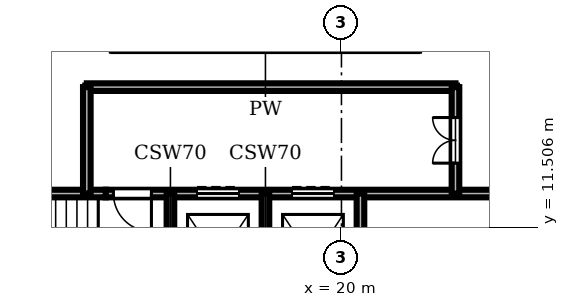
"""IFC4 building model, lengths in metres.
Left out: names, types, materials, properties, quantities, classifications, styles, units other than length and angle.
Written with IfcOpenShell. Run it as: python <this file> out.ifc"""

import sys

from ifc_helpers import new_model, si_unit, direction, frame, frame_2d, origin, place, context, subcontext, project, spatial, rectangle, extrude, element, fill, save


model = new_model("IFC4")
c1 = context("Model", 3, precision=1e-05, world=origin(), true_north=direction((0.0, 1.0)))
c2 = subcontext(c1, "Body", "Model", "MODEL_VIEW")
j1 = project(units=[si_unit("LENGTHUNIT", "METRE"), si_unit("PLANEANGLEUNIT", "RADIAN")], contexts=[c1])
p1 = place(None, origin())
s1 = spatial("IfcSite", under=j1, at=p1, CompositionType="ELEMENT")
p2 = place(p1, origin())
s2 = spatial("IfcBuilding", under=s1, at=p2, CompositionType="ELEMENT")
p3 = place(p2, frame((0.0, 0.0, 225.3)))
s3 = spatial("IfcBuildingStorey", under=s2, at=p3, CompositionType="ELEMENT", Elevation=225.3)
p4 = place(p3, frame((8.7, 12.4, 0.0), z_axis=(0.0, 0.0, 1.0), x_axis=(1.0, 0.0, 0.0)))
e1 = element("IfcWall", 1, at=p4, inside=s3, PredefinedType="SHEAR", context=c2, shape_type="SweptSolid", body=[
    extrude(rectangle(XDim=5.1, YDim=0.2, at=frame_2d((2.55, 0.0))), origin(), (0.0, 0.0, 1.0), 3.58),
])
p5 = place(p3, frame((13.8, 12.4, 0.0), z_axis=(0.0, 0.0, 1.0), x_axis=(1.0, 0.0, 0.0)))
e2 = element("IfcWall", 2, at=p5, inside=s3, PredefinedType="SHEAR", context=c2, shape_type="SweptSolid", body=[
    extrude(rectangle(XDim=13.5, YDim=0.2, at=frame_2d((6.75, 0.0))), origin(), (0.0, 0.0, 1.0), 3.58),
])
p6 = place(p5, frame((2.4, 0.0, 0.0)))
e3 = element("IfcOpeningElement", 3, at=p6, cuts=e2, PredefinedType="OPENING", context=c2, shape_type="SweptSolid", body=[
    extrude(rectangle(XDim=1.1, YDim=2.1, at=frame_2d((0.55, 1.05))), frame((0.0, 0.11, 0.0), z_axis=(0.0, -1.0, 0.0), x_axis=(1.0, 0.0, 0.0)), (0.0, 0.0, 1.0), 0.22),
])
p7 = place(p5, frame((4.9, 0.0, 0.0)))
e4 = element("IfcOpeningElement", 4, at=p7, cuts=e2, PredefinedType="OPENING", context=c2, shape_type="SweptSolid", body=[
    extrude(rectangle(XDim=1.1, YDim=2.1, at=frame_2d((0.55, 1.05))), frame((0.0, 0.11, 0.0), z_axis=(0.0, -1.0, 0.0), x_axis=(1.0, 0.0, 0.0)), (0.0, 0.0, 1.0), 0.22),
])
p8 = place(p5, frame((0.2, 0.0, 0.0)))
e5 = element("IfcOpeningElement", 5, at=p8, cuts=e2, PredefinedType="OPENING", context=c2, shape_type="SweptSolid", body=[
    extrude(rectangle(XDim=1.0, YDim=2.1, at=frame_2d((0.5, 1.05))), frame((0.0, 0.11, 0.0), z_axis=(0.0, -1.0, 0.0), x_axis=(1.0, 0.0, 0.0)), (0.0, 0.0, 1.0), 0.22),
])
p9 = place(p3, frame((13.3, 15.2, 0.0), z_axis=(0.0, 0.0, 1.0), x_axis=(1.0, 0.0, 0.0)))
e6 = element("IfcWall", 6, at=p9, inside=s3, PredefinedType="SHEAR", context=c2, shape_type="SweptSolid", body=[
    extrude(rectangle(XDim=9.7, YDim=0.2, at=frame_2d((4.85, 0.0))), origin(), (0.0, 0.0, 1.0), 3.58),
])
p10 = place(p3, frame((13.3, 12.4, 0.0), z_axis=(0.0, 0.0, 1.0), x_axis=(0.0, 1.0, 0.0)))
e7 = element("IfcWall", 7, at=p10, inside=s3, PredefinedType="SHEAR", context=c2, shape_type="SweptSolid", body=[
    extrude(rectangle(XDim=2.8, YDim=0.2, at=frame_2d((1.4, 0.0))), origin(), (0.0, 0.0, 1.0), 3.58),
])
for number, where, z_axis, x_axis in (
    (8, (15.5, 8.7, 0.0), (0.0, 0.0, 1.0), (0.0, 1.0, 0.0)),
    (9, (18.0, 8.7, 0.0), (0.0, 0.0, 1.0), (0.0, 1.0, 0.0)),
    (10, (20.5, 8.7, 0.0), (0.0, 0.0, 1.0), (0.0, 1.0, 0.0)),
):
    element("IfcWall", number, at=place(p3, frame(where, z_axis=z_axis, x_axis=x_axis)), inside=s3, PredefinedType="SHEAR", context=c2, shape_type="SweptSolid", body=[
        extrude(rectangle(XDim=3.7, YDim=0.2, at=frame_2d((1.85, 0.0))), origin(), (0.0, 0.0, 1.0), 3.58),
    ])
p11 = place(p3, frame((23.0, 12.4, 0.0), z_axis=(0.0, 0.0, 1.0), x_axis=(0.0, 1.0, 0.0)))
e11 = element("IfcWall", 11, at=p11, inside=s3, PredefinedType="SHEAR", context=c2, shape_type="SweptSolid", body=[
    extrude(rectangle(XDim=2.8, YDim=0.2, at=frame_2d((1.4, 0.0))), origin(), (0.0, 0.0, 1.0), 3.58),
])
p12 = place(p11, frame((0.8, 0.0, 0.0)))
e12 = element("IfcOpeningElement", 12, at=p12, cuts=e11, PredefinedType="OPENING", context=c2, shape_type="SweptSolid", body=[
    extrude(rectangle(XDim=1.2, YDim=2.1, at=frame_2d((0.6, 1.05))), frame((0.0, 0.11, 0.0), z_axis=(0.0, -1.0, 0.0), x_axis=(1.0, 0.0, 0.0)), (0.0, 0.0, 1.0), 0.22),
])
p13 = place(p6, origin())
e13 = element("IfcDoor", 13, at=p13, inside=s3, OperationType="DOUBLE_DOOR_SLIDING", PredefinedType="DOOR", context=c2, shape_type="SweptSolid", body=[
    extrude(rectangle(XDim=1.1, YDim=2.1, at=frame_2d((0.55, 1.05))), frame((0.0, 0.025, 0.0), z_axis=(0.0, -1.0, 0.0), x_axis=(1.0, 0.0, 0.0)), (0.0, 0.0, 1.0), 0.05),
])
fill(e3, e13)
p14 = place(p7, origin())
e14 = element("IfcDoor", 14, at=p14, inside=s3, OperationType="DOUBLE_DOOR_SLIDING", PredefinedType="DOOR", context=c2, shape_type="SweptSolid", body=[
    extrude(rectangle(XDim=1.1, YDim=2.1, at=frame_2d((0.55, 1.05))), frame((0.0, 0.025, 0.0), z_axis=(0.0, -1.0, 0.0), x_axis=(1.0, 0.0, 0.0)), (0.0, 0.0, 1.0), 0.05),
])
fill(e4, e14)
p15 = place(p8, frame((1.0, 0.0, 0.0), z_axis=(0.0, 0.0, 1.0), x_axis=(-1.0, 0.0, 0.0)))
e15 = element("IfcDoor", 15, at=p15, inside=s3, OperationType="SINGLE_SWING_LEFT", PredefinedType="DOOR", context=c2, shape_type="SweptSolid", body=[
    extrude(rectangle(XDim=1.0, YDim=2.1, at=frame_2d((0.5, 1.05))), frame((0.0, 0.025, 0.0), z_axis=(0.0, -1.0, 0.0), x_axis=(1.0, 0.0, 0.0)), (0.0, 0.0, 1.0), 0.05),
])
fill(e5, e15)
p16 = place(p12, origin())
e16 = element("IfcDoor", 16, at=p16, inside=s3, OperationType="DOUBLE_DOOR_SINGLE_SWING", PredefinedType="DOOR", context=c2, shape_type="SweptSolid", body=[
    extrude(rectangle(XDim=1.2, YDim=2.1, at=frame_2d((0.6, 1.05))), frame((0.0, 0.025, 0.0), z_axis=(0.0, -1.0, 0.0), x_axis=(1.0, 0.0, 0.0)), (0.0, 0.0, 1.0), 0.05),
])
fill(e12, e16)
save(model, sys.argv[1])
